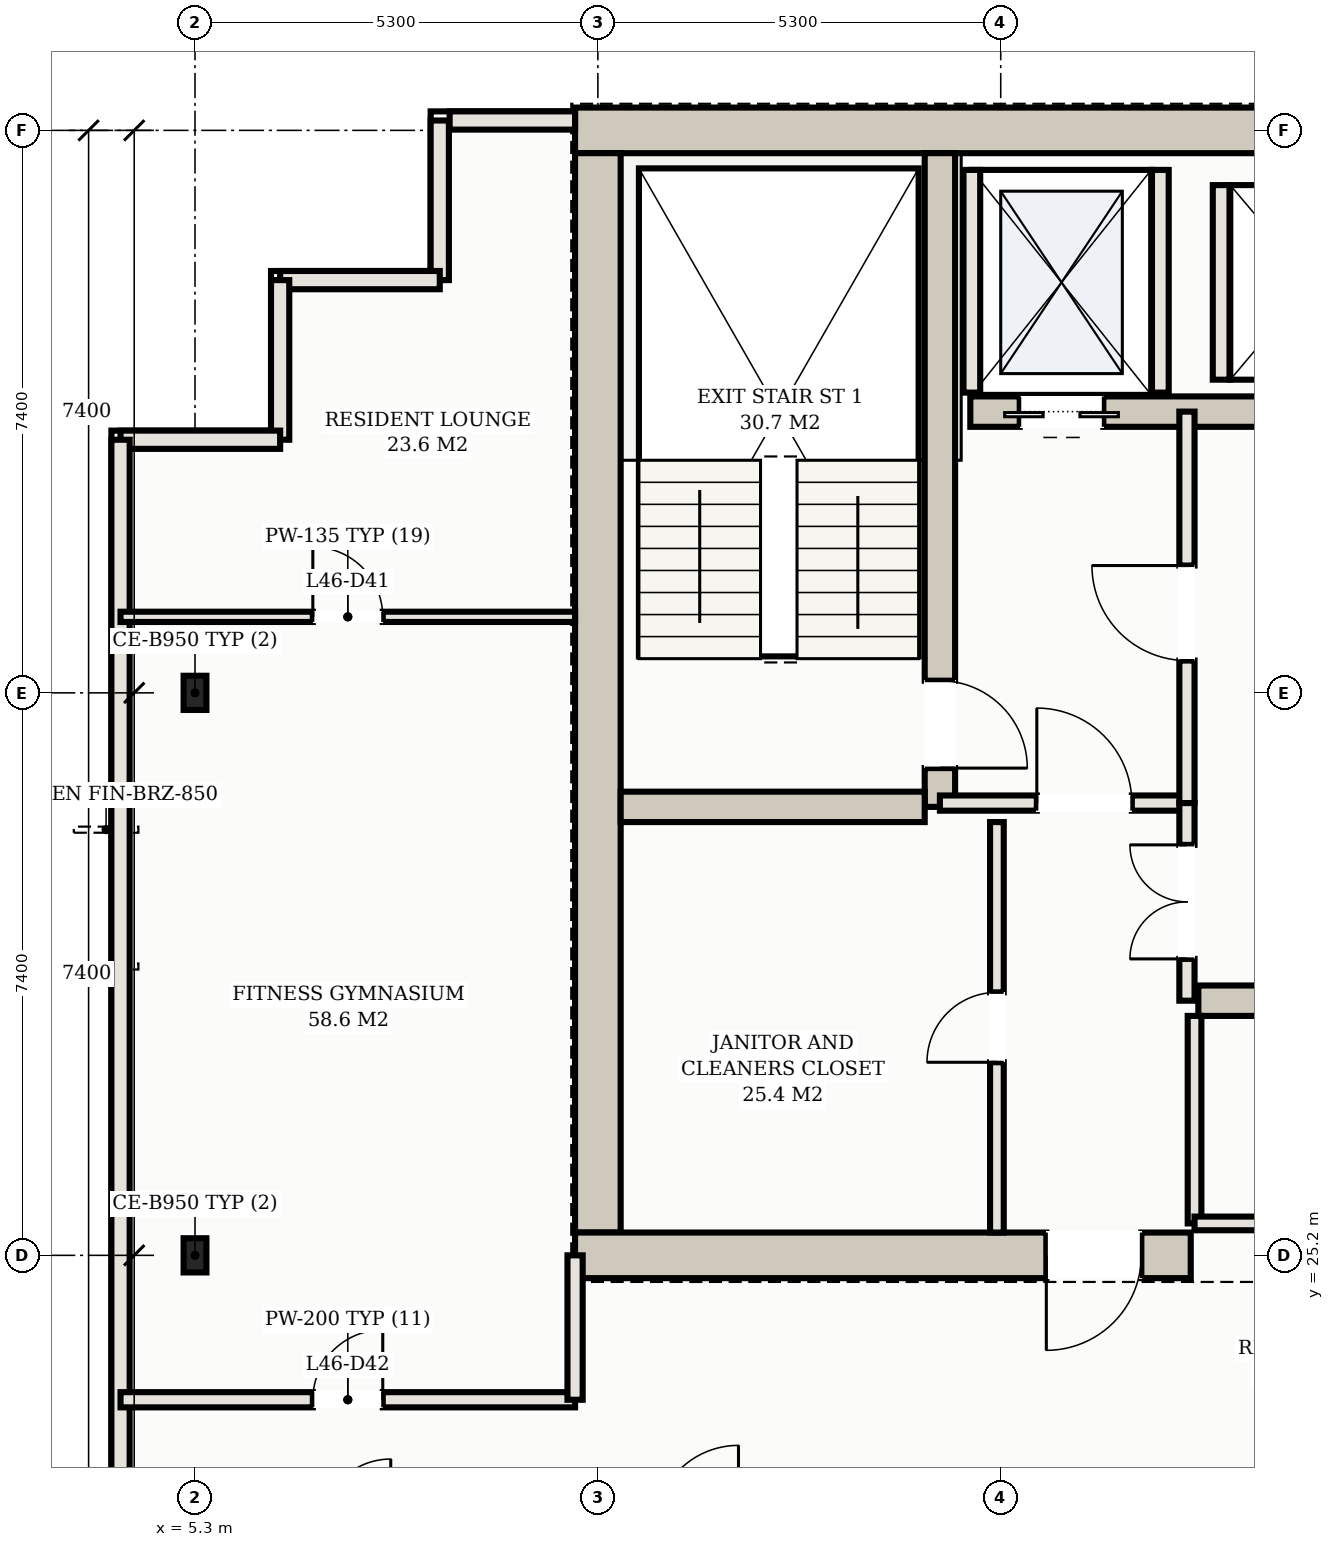
"""IFC4 building model, lengths in metres.
Left out: names, types, materials, properties, quantities, classifications, styles, units other than length and angle.
Written with IfcOpenShell. Run it as: python <this file> out.ifc"""

import sys

from ifc_helpers import new_model, si_unit, direction, frame, frame_2d, origin, origin_2d, place, context, subcontext, project, spatial, rectangle, hollow_rectangle, extrude, element, fill, save


model = new_model("IFC4")
c1 = context("Model", 3, precision=1e-05, world=origin(), true_north=direction((0.0, 1.0)))
c2 = subcontext(c1, "Body", "Model", "MODEL_VIEW")
j1 = project(units=[si_unit("LENGTHUNIT", "METRE"), si_unit("PLANEANGLEUNIT", "RADIAN")], contexts=[c1])
p1 = place(None, origin())
s1 = spatial("IfcSite", under=j1, at=p1, CompositionType="ELEMENT")
p2 = place(p1, origin())
s2 = spatial("IfcBuilding", under=s1, at=p2, CompositionType="ELEMENT")
p3 = place(p2, frame((0.0, 0.0, 168.9)))
s3 = spatial("IfcBuildingStorey", under=s2, at=p3, CompositionType="ELEMENT", Elevation=168.9)
p4 = place(p3, frame((10.3, 40.0, 0.0), z_axis=(0.0, 0.0, 1.0), x_axis=(1.0, 0.0, 0.0)))
e1 = element("IfcWall", 1, at=p4, inside=s3, PredefinedType="SHEAR", context=c2, shape_type="SweptSolid", body=[
    extrude(rectangle(XDim=32.4, YDim=0.6, at=frame_2d((16.2, 0.0))), origin(), (0.0, 0.0, 1.0), 3.1),
])
p5 = place(p3, frame((10.6, 25.5, 0.0), z_axis=(0.0, 0.0, 1.0), x_axis=(0.0, 1.0, 0.0)))
e2 = element("IfcWall", 2, at=p5, inside=s3, PredefinedType="SHEAR", context=c2, shape_type="SweptSolid", body=[
    extrude(rectangle(XDim=14.2, YDim=0.6, at=frame_2d((7.1, 0.0))), origin(), (0.0, 0.0, 1.0), 3.1),
])
p6 = place(p3, frame((10.3, 25.2, 0.0), z_axis=(0.0, 0.0, 1.0), x_axis=(1.0, 0.0, 0.0)))
e3 = element("IfcWall", 3, at=p6, inside=s3, PredefinedType="SHEAR", context=c2, shape_type="SweptSolid", body=[
    extrude(rectangle(XDim=8.1, YDim=0.6, at=frame_2d((4.05, 0.0))), origin(), (0.0, 0.0, 1.0), 3.1),
])
p7 = place(p6, frame((6.2, 0.0, 0.0)))
e4 = element("IfcOpeningElement", 4, at=p7, cuts=e3, PredefinedType="OPENING", context=c2, shape_type="SweptSolid", body=[
    extrude(rectangle(XDim=1.25, YDim=2.2, at=frame_2d((0.625, 1.1))), frame((0.0, 0.31, 0.0), z_axis=(0.0, -1.0, 0.0), x_axis=(1.0, 0.0, 0.0)), (0.0, 0.0, 1.0), 0.62),
])
p8 = place(p3, frame((15.1, 31.1, 0.0), z_axis=(0.0, 0.0, 1.0), x_axis=(0.0, 1.0, 0.0)))
e5 = element("IfcWall", 5, at=p8, inside=s3, PredefinedType="SHEAR", context=c2, shape_type="SweptSolid", body=[
    extrude(rectangle(XDim=8.6, YDim=0.4, at=frame_2d((4.3, 0.0))), origin(), (0.0, 0.0, 1.0), 3.1),
])
p9 = place(p8, frame((0.51, 0.0, 0.0)))
e6 = element("IfcOpeningElement", 6, at=p9, cuts=e5, PredefinedType="OPENING", context=c2, shape_type="SweptSolid", body=[
    extrude(rectangle(XDim=1.15, YDim=2.2, at=frame_2d((0.575, 1.1))), frame((0.0, 0.21, 0.0), z_axis=(0.0, -1.0, 0.0), x_axis=(1.0, 0.0, 0.0)), (0.0, 0.0, 1.0), 0.42),
])
p10 = place(p3, frame((10.9, 31.1, 0.0), z_axis=(0.0, 0.0, 1.0), x_axis=(1.0, 0.0, 0.0)))
e7 = element("IfcWall", 7, at=p10, inside=s3, PredefinedType="SHEAR", context=c2, shape_type="SweptSolid", body=[
    extrude(rectangle(XDim=4.0, YDim=0.4, at=frame_2d((2.0, 0.0))), origin(), (0.0, 0.0, 1.0), 3.1),
])
p11 = place(p3, frame((15.5, 36.3, 0.0), z_axis=(0.0, 0.0, 1.0), x_axis=(1.0, 0.0, 0.0)))
e8 = element("IfcWall", 8, at=p11, inside=s3, PredefinedType="SHEAR", context=c2, shape_type="SweptSolid", body=[
    extrude(rectangle(XDim=22.0, YDim=0.4, at=frame_2d((11.0, 0.0))), origin(), (0.0, 0.0, 1.0), 3.1),
])
p12 = place(p11, frame((0.65, 0.0, 0.0)))
e9 = element("IfcOpeningElement", 9, at=p12, cuts=e8, PredefinedType="OPENING", context=c2, shape_type="SweptSolid", body=[
    extrude(rectangle(XDim=1.1, YDim=2.15, at=frame_2d((0.55, 1.075))), frame((0.0, 0.21, 0.0), z_axis=(0.0, -1.0, 0.0), x_axis=(1.0, 0.0, 0.0)), (0.0, 0.0, 1.0), 0.42),
])
p13 = place(p11, frame((20.25, 0.0, 0.0)))
e10 = element("IfcOpeningElement", 10, at=p13, cuts=e8, PredefinedType="OPENING", context=c2, shape_type="SweptSolid", body=[
    extrude(rectangle(XDim=1.1, YDim=2.15, at=frame_2d((0.55, 1.075))), frame((0.0, 0.21, 0.0), z_axis=(0.0, -1.0, 0.0), x_axis=(1.0, 0.0, 0.0)), (0.0, 0.0, 1.0), 0.42),
])
p14 = place(p11, frame((17.05, 0.0, 0.0)))
e11 = element("IfcOpeningElement", 11, at=p14, cuts=e8, PredefinedType="OPENING", context=c2, shape_type="SweptSolid", body=[
    extrude(rectangle(XDim=1.3, YDim=2.2, at=frame_2d((0.65, 1.1))), frame((0.0, 0.21, 0.0), z_axis=(0.0, -1.0, 0.0), x_axis=(1.0, 0.0, 0.0)), (0.0, 0.0, 1.0), 0.42),
])
p15 = place(p3, frame((18.5, 28.55, 0.0), z_axis=(0.0, 0.0, 1.0), x_axis=(1.0, 0.0, 0.0)))
e12 = element("IfcWall", 12, at=p15, inside=s3, PredefinedType="SHEAR", context=c2, shape_type="SweptSolid", body=[
    extrude(rectangle(XDim=16.0, YDim=0.4, at=frame_2d((8.0, 0.0))), origin(), (0.0, 0.0, 1.0), 3.1),
])
p16 = place(p15, frame((8.95, 0.0, 0.0)))
e13 = element("IfcOpeningElement", 13, at=p16, cuts=e12, PredefinedType="OPENING", context=c2, shape_type="SweptSolid", body=[
    extrude(rectangle(XDim=1.1, YDim=2.15, at=frame_2d((0.55, 1.075))), frame((0.0, 0.21, 0.0), z_axis=(0.0, -1.0, 0.0), x_axis=(1.0, 0.0, 0.0)), (0.0, 0.0, 1.0), 0.42),
])
p17 = place(p15, frame((11.55, 0.0, 0.0)))
e14 = element("IfcOpeningElement", 14, at=p17, cuts=e12, PredefinedType="OPENING", context=c2, shape_type="SweptSolid", body=[
    extrude(rectangle(XDim=1.1, YDim=2.15, at=frame_2d((0.55, 1.075))), frame((0.0, 0.21, 0.0), z_axis=(0.0, -1.0, 0.0), x_axis=(1.0, 0.0, 0.0)), (0.0, 0.0, 1.0), 0.42),
])
p18 = place(p15, frame((14.15, 0.0, 0.0)))
e15 = element("IfcOpeningElement", 15, at=p18, cuts=e12, PredefinedType="OPENING", context=c2, shape_type="SweptSolid", body=[
    extrude(rectangle(XDim=1.1, YDim=2.15, at=frame_2d((0.55, 1.075))), frame((0.0, 0.21, 0.0), z_axis=(0.0, -1.0, 0.0), x_axis=(1.0, 0.0, 0.0)), (0.0, 0.0, 1.0), 0.42),
])
for number, where, z_axis, x_axis in (
    (16, (5.3, 25.2, 0.0), (0.0, 0.0, 1.0), (1.0, 0.0, 0.0)),
    (17, (5.3, 32.6, 0.0), (0.0, 0.0, 1.0), (1.0, 0.0, 0.0)),
):
    element("IfcColumn", number, at=place(p3, frame(where, z_axis=z_axis, x_axis=x_axis)), inside=s3, PredefinedType="COLUMN", context=c2, shape_type="SweptSolid", body=[
        extrude(hollow_rectangle(XDim=0.3, YDim=0.45, WallThickness=0.016, at=origin_2d()), origin(), (0.0, 0.0, 1.0), 3.3),
    ])
for number, where, z_axis, x_axis in (
    (18, (15.52, 36.55, 0.0), (0.0, 0.0, 1.0), (0.0, 1.0, 0.0)),
    (19, (18.0, 36.55, 0.0), (0.0, 0.0, 1.0), (0.0, 1.0, 0.0)),
):
    element("IfcWall", number, at=place(p3, frame(where, z_axis=z_axis, x_axis=x_axis)), inside=s3, PredefinedType="SOLIDWALL", context=c2, shape_type="SweptSolid", body=[
        extrude(rectangle(XDim=2.93, YDim=0.22, at=frame_2d((1.465, 0.0))), origin(), (0.0, 0.0, 1.0), 3.1),
    ])
p19 = place(p3, frame((18.8, 36.72, 0.0), z_axis=(0.0, 0.0, 1.0), x_axis=(0.0, 1.0, 0.0)))
e20 = element("IfcWall", 20, at=p19, inside=s3, PredefinedType="SOLIDWALL", context=c2, shape_type="SweptSolid", body=[
    extrude(rectangle(XDim=2.56, YDim=0.22, at=frame_2d((1.28, 0.0))), origin(), (0.0, 0.0, 1.0), 3.1),
])
p20 = place(p3, frame((10.3, 40.13, 0.0), z_axis=(0.0, 0.0, 1.0), x_axis=(-1.0, 0.0, 0.0)))
e21 = element("IfcWall", 21, at=p20, inside=s3, PredefinedType="SOLIDWALL", context=c2, shape_type="SweptSolid", body=[
    extrude(rectangle(XDim=1.65, YDim=0.24, at=frame_2d((0.825, 0.0))), origin(), (0.0, 0.0, 1.0), 3.1),
])
p21 = place(p3, frame((8.52, 40.13, 0.0), z_axis=(0.0, 0.0, 1.0), x_axis=(0.0, -1.0, 0.0)))
e22 = element("IfcWall", 22, at=p21, inside=s3, PredefinedType="SOLIDWALL", context=c2, shape_type="SweptSolid", body=[
    extrude(rectangle(XDim=2.1, YDim=0.24, at=frame_2d((1.05, 0.0))), origin(), (0.0, 0.0, 1.0), 3.1),
])
for number, where, z_axis, x_axis in (
    (23, (8.52, 38.03, 0.0), (0.0, 0.0, 1.0), (-1.0, 0.0, 0.0)),
    (24, (6.42, 38.03, 0.0), (0.0, 0.0, 1.0), (0.0, -1.0, 0.0)),
):
    element("IfcWall", number, at=place(p3, frame(where, z_axis=z_axis, x_axis=x_axis)), inside=s3, PredefinedType="SOLIDWALL", context=c2, shape_type="SweptSolid", body=[
        extrude(rectangle(XDim=2.1, YDim=0.24, at=frame_2d((1.05, 0.0))), origin(), (0.0, 0.0, 1.0), 3.1),
    ])
p22 = place(p3, frame((6.42, 35.93, 0.0), z_axis=(0.0, 0.0, 1.0), x_axis=(-1.0, 0.0, 0.0)))
e25 = element("IfcWall", 25, at=p22, inside=s3, PredefinedType="SOLIDWALL", context=c2, shape_type="SweptSolid", body=[
    extrude(rectangle(XDim=2.1, YDim=0.24, at=frame_2d((1.05, 0.0))), origin(), (0.0, 0.0, 1.0), 3.1),
])
p23 = place(p3, frame((4.32, 35.93, 0.0), z_axis=(0.0, 0.0, 1.0), x_axis=(0.0, -1.0, 0.0)))
e26 = element("IfcWall", 26, at=p23, inside=s3, PredefinedType="SOLIDWALL", context=c2, shape_type="SweptSolid", body=[
    extrude(rectangle(XDim=27.41, YDim=0.24, at=frame_2d((13.705, 0.0))), origin(), (0.0, 0.0, 1.0), 3.1),
])
p24 = place(p3, frame((15.1, 31.15, 0.0), z_axis=(0.0, 0.0, 1.0), x_axis=(1.0, 0.0, 0.0)))
e27 = element("IfcWall", 27, at=p24, inside=s3, PredefinedType="PARTITIONING", context=c2, shape_type="SweptSolid", body=[
    extrude(rectangle(XDim=3.25, YDim=0.2, at=frame_2d((1.625, 0.0))), origin(), (0.0, 0.0, 1.0), 2.38),
])
p25 = place(p24, frame((1.275, 0.0, 0.0)))
e28 = element("IfcOpeningElement", 28, at=p25, cuts=e27, PredefinedType="OPENING", context=c2, shape_type="SweptSolid", body=[
    extrude(rectangle(XDim=1.25, YDim=2.2, at=frame_2d((0.625, 1.1))), frame((0.0, 0.11, 0.0), z_axis=(0.0, -1.0, 0.0), x_axis=(1.0, 0.0, 0.0)), (0.0, 0.0, 1.0), 0.22),
])
p26 = place(p3, frame((18.35, 31.15, 0.0), z_axis=(0.0, 0.0, 1.0), x_axis=(0.0, 1.0, 0.0)))
e29 = element("IfcWall", 29, at=p26, inside=s3, PredefinedType="PARTITIONING", context=c2, shape_type="SweptSolid", body=[
    extrude(rectangle(XDim=5.15, YDim=0.2, at=frame_2d((2.575, 0.0))), origin(), (0.0, 0.0, 1.0), 2.38),
])
p27 = place(p26, frame((1.875, 0.0, 0.0)))
e30 = element("IfcOpeningElement", 30, at=p27, cuts=e29, PredefinedType="OPENING", context=c2, shape_type="SweptSolid", body=[
    extrude(rectangle(XDim=1.25, YDim=2.2, at=frame_2d((0.625, 1.1))), frame((0.0, 0.11, 0.0), z_axis=(0.0, -1.0, 0.0), x_axis=(1.0, 0.0, 0.0)), (0.0, 0.0, 1.0), 0.22),
])
p28 = place(p3, frame((15.85, 25.5, 0.0), z_axis=(0.0, 0.0, 1.0), x_axis=(0.0, 1.0, 0.0)))
e31 = element("IfcWall", 31, at=p28, inside=s3, PredefinedType="PARTITIONING", context=c2, shape_type="SweptSolid", body=[
    extrude(rectangle(XDim=5.4, YDim=0.18, at=frame_2d((2.7, 0.0))), origin(), (0.0, 0.0, 1.0), 2.38),
])
p29 = place(p28, frame((2.24, 0.0, 0.0)))
e32 = element("IfcOpeningElement", 32, at=p29, cuts=e31, PredefinedType="OPENING", context=c2, shape_type="SweptSolid", body=[
    extrude(rectangle(XDim=0.92, YDim=2.15, at=frame_2d((0.46, 1.075))), frame((0.0, 0.1, 0.0), z_axis=(0.0, -1.0, 0.0), x_axis=(1.0, 0.0, 0.0)), (0.0, 0.0, 1.0), 0.2),
])
p30 = place(p3, frame((18.35, 28.55, 0.0), z_axis=(0.0, 0.0, 1.0), x_axis=(0.0, 1.0, 0.0)))
e33 = element("IfcWall", 33, at=p30, inside=s3, PredefinedType="PARTITIONING", context=c2, shape_type="SweptSolid", body=[
    extrude(rectangle(XDim=2.6, YDim=0.2, at=frame_2d((1.3, 0.0))), origin(), (0.0, 0.0, 1.0), 2.38),
])
p31 = place(p30, frame((0.55, 0.0, 0.0)))
e34 = element("IfcOpeningElement", 34, at=p31, cuts=e33, PredefinedType="OPENING", context=c2, shape_type="SweptSolid", body=[
    extrude(rectangle(XDim=1.5, YDim=2.25, at=frame_2d((0.75, 1.125))), frame((0.0, 0.11, 0.0), z_axis=(0.0, -1.0, 0.0), x_axis=(1.0, 0.0, 0.0)), (0.0, 0.0, 1.0), 0.22),
])
p32 = place(p3, frame((18.45, 25.62, 0.0), z_axis=(0.0, 0.0, 1.0), x_axis=(0.0, 1.0, 0.0)))
e35 = element("IfcWall", 35, at=p32, inside=s3, PredefinedType="PARTITIONING", context=c2, shape_type="SweptSolid", body=[
    extrude(rectangle(XDim=2.73, YDim=0.18, at=frame_2d((1.365, 0.0))), origin(), (0.0, 0.0, 1.0), 2.38),
])
p33 = place(p3, frame((18.45, 25.62, 0.0), z_axis=(0.0, 0.0, 1.0), x_axis=(1.0, 0.0, 0.0)))
e36 = element("IfcWall", 36, at=p33, inside=s3, PredefinedType="PARTITIONING", context=c2, shape_type="SweptSolid", body=[
    extrude(rectangle(XDim=7.9, YDim=0.18, at=frame_2d((3.95, 0.0))), origin(), (0.0, 0.0, 1.0), 2.38),
])
p34 = place(p33, frame((3.34, 0.0, 0.0)))
e37 = element("IfcOpeningElement", 37, at=p34, cuts=e36, PredefinedType="OPENING", context=c2, shape_type="SweptSolid", body=[
    extrude(rectangle(XDim=0.92, YDim=2.15, at=frame_2d((0.46, 1.075))), frame((0.0, 0.1, 0.0), z_axis=(0.0, -1.0, 0.0), x_axis=(1.0, 0.0, 0.0)), (0.0, 0.0, 1.0), 0.2),
])
p35 = place(p3, frame((4.32, 23.3, 0.0), z_axis=(0.0, 0.0, 1.0), x_axis=(1.0, 0.0, 0.0)))
e38 = element("IfcWall", 38, at=p35, inside=s3, PredefinedType="PARTITIONING", context=c2, shape_type="SweptSolid", body=[
    extrude(rectangle(XDim=5.98, YDim=0.2, at=frame_2d((2.99, 0.0))), origin(), (0.0, 0.0, 1.0), 2.38),
])
p36 = place(p35, frame((2.53, 0.0, 0.0)))
e39 = element("IfcOpeningElement", 39, at=p36, cuts=e38, PredefinedType="OPENING", context=c2, shape_type="SweptSolid", body=[
    extrude(rectangle(XDim=0.92, YDim=2.15, at=frame_2d((0.46, 1.075))), frame((0.0, 0.11, 0.0), z_axis=(0.0, -1.0, 0.0), x_axis=(1.0, 0.0, 0.0)), (0.0, 0.0, 1.0), 0.22),
])
p37 = place(p3, frame((10.3, 23.3, 0.0), z_axis=(0.0, 0.0, 1.0), x_axis=(0.0, 1.0, 0.0)))
e40 = element("IfcWall", 40, at=p37, inside=s3, PredefinedType="PARTITIONING", context=c2, shape_type="SweptSolid", body=[
    extrude(rectangle(XDim=1.9, YDim=0.2, at=frame_2d((0.95, 0.0))), origin(), (0.0, 0.0, 1.0), 2.38),
])
p38 = place(p3, frame((4.32, 33.6, 0.0), z_axis=(0.0, 0.0, 1.0), x_axis=(1.0, 0.0, 0.0)))
e41 = element("IfcWall", 41, at=p38, inside=s3, PredefinedType="PARTITIONING", context=c2, shape_type="SweptSolid", body=[
    extrude(rectangle(XDim=5.98, YDim=0.135, at=frame_2d((2.99, 0.0))), origin(), (0.0, 0.0, 1.0), 2.38),
])
p39 = place(p38, frame((2.53, 0.0, 0.0)))
e42 = element("IfcOpeningElement", 42, at=p39, cuts=e41, PredefinedType="OPENING", context=c2, shape_type="SweptSolid", body=[
    extrude(rectangle(XDim=0.92, YDim=2.15, at=frame_2d((0.46, 1.075))), frame((0.0, 0.078, 0.0), z_axis=(0.0, -1.0, 0.0), x_axis=(1.0, 0.0, 0.0)), (0.0, 0.0, 1.0), 0.155),
])
p40 = place(p12, frame((1.1, 0.0, 0.0), z_axis=(0.0, 0.0, 1.0), x_axis=(-1.0, 0.0, 0.0)))
e43 = element("IfcDoor", 43, at=p40, inside=s3, OperationType="DOUBLE_DOOR_SLIDING", PredefinedType="DOOR", context=c2, shape_type="SweptSolid", body=[
    extrude(rectangle(XDim=1.1, YDim=2.15, at=frame_2d((0.55, 1.075))), frame((0.0, 0.025, 0.0), z_axis=(0.0, -1.0, 0.0), x_axis=(1.0, 0.0, 0.0)), (0.0, 0.0, 1.0), 0.05),
])
fill(e9, e43)
p41 = place(p7, frame((1.25, 0.0, 0.0), z_axis=(0.0, 0.0, 1.0), x_axis=(-1.0, 0.0, 0.0)))
e44 = element("IfcDoor", 44, at=p41, inside=s3, OperationType="SINGLE_SWING_RIGHT", PredefinedType="DOOR", context=c2, shape_type="SweptSolid", body=[
    extrude(rectangle(XDim=1.25, YDim=2.2, at=frame_2d((0.625, 1.1))), frame((0.0, 0.025, 0.0), z_axis=(0.0, -1.0, 0.0), x_axis=(1.0, 0.0, 0.0)), (0.0, 0.0, 1.0), 0.05),
])
fill(e4, e44)
p42 = place(p25, origin())
e45 = element("IfcDoor", 45, at=p42, inside=s3, OperationType="SINGLE_SWING_LEFT", PredefinedType="DOOR", context=c2, shape_type="SweptSolid", body=[
    extrude(rectangle(XDim=1.25, YDim=2.2, at=frame_2d((0.625, 1.1))), frame((0.0, 0.025, 0.0), z_axis=(0.0, -1.0, 0.0), x_axis=(1.0, 0.0, 0.0)), (0.0, 0.0, 1.0), 0.05),
])
fill(e28, e45)
p43 = place(p27, origin())
e46 = element("IfcDoor", 46, at=p43, inside=s3, OperationType="SINGLE_SWING_RIGHT", PredefinedType="DOOR", context=c2, shape_type="SweptSolid", body=[
    extrude(rectangle(XDim=1.25, YDim=2.2, at=frame_2d((0.625, 1.1))), frame((0.0, 0.025, 0.0), z_axis=(0.0, -1.0, 0.0), x_axis=(1.0, 0.0, 0.0)), (0.0, 0.0, 1.0), 0.05),
])
fill(e30, e46)
p44 = place(p9, frame((1.15, 0.0, 0.0), z_axis=(0.0, 0.0, 1.0), x_axis=(-1.0, 0.0, 0.0)))
e47 = element("IfcDoor", 47, at=p44, inside=s3, OperationType="SINGLE_SWING_RIGHT", PredefinedType="DOOR", context=c2, shape_type="SweptSolid", body=[
    extrude(rectangle(XDim=1.15, YDim=2.2, at=frame_2d((0.575, 1.1))), frame((0.0, 0.025, 0.0), z_axis=(0.0, -1.0, 0.0), x_axis=(1.0, 0.0, 0.0)), (0.0, 0.0, 1.0), 0.05),
])
fill(e6, e47)
p45 = place(p29, origin())
e48 = element("IfcDoor", 48, at=p45, inside=s3, OperationType="SINGLE_SWING_LEFT", PredefinedType="DOOR", context=c2, shape_type="SweptSolid", body=[
    extrude(rectangle(XDim=0.92, YDim=2.15, at=frame_2d((0.46, 1.075))), frame((0.0, 0.025, 0.0), z_axis=(0.0, -1.0, 0.0), x_axis=(1.0, 0.0, 0.0)), (0.0, 0.0, 1.0), 0.05),
])
fill(e32, e48)
p46 = place(p31, origin())
e49 = element("IfcDoor", 49, at=p46, inside=s3, OperationType="DOUBLE_DOOR_SINGLE_SWING", PredefinedType="DOOR", context=c2, shape_type="SweptSolid", body=[
    extrude(rectangle(XDim=1.5, YDim=2.25, at=frame_2d((0.75, 1.125))), frame((0.0, 0.025, 0.0), z_axis=(0.0, -1.0, 0.0), x_axis=(1.0, 0.0, 0.0)), (0.0, 0.0, 1.0), 0.05),
])
fill(e34, e49)
p47 = place(p39, origin())
e50 = element("IfcDoor", 50, at=p47, inside=s3, OperationType="SINGLE_SWING_LEFT", PredefinedType="DOOR", context=c2, shape_type="SweptSolid", body=[
    extrude(rectangle(XDim=0.92, YDim=2.15, at=frame_2d((0.46, 1.075))), frame((0.0, 0.025, 0.0), z_axis=(0.0, -1.0, 0.0), x_axis=(1.0, 0.0, 0.0)), (0.0, 0.0, 1.0), 0.05),
])
fill(e42, e50)
p48 = place(p36, origin())
e51 = element("IfcDoor", 51, at=p48, inside=s3, OperationType="SINGLE_SWING_RIGHT", PredefinedType="DOOR", context=c2, shape_type="SweptSolid", body=[
    extrude(rectangle(XDim=0.92, YDim=2.15, at=frame_2d((0.46, 1.075))), frame((0.0, 0.025, 0.0), z_axis=(0.0, -1.0, 0.0), x_axis=(1.0, 0.0, 0.0)), (0.0, 0.0, 1.0), 0.05),
])
fill(e39, e51)
save(model, sys.argv[1])
